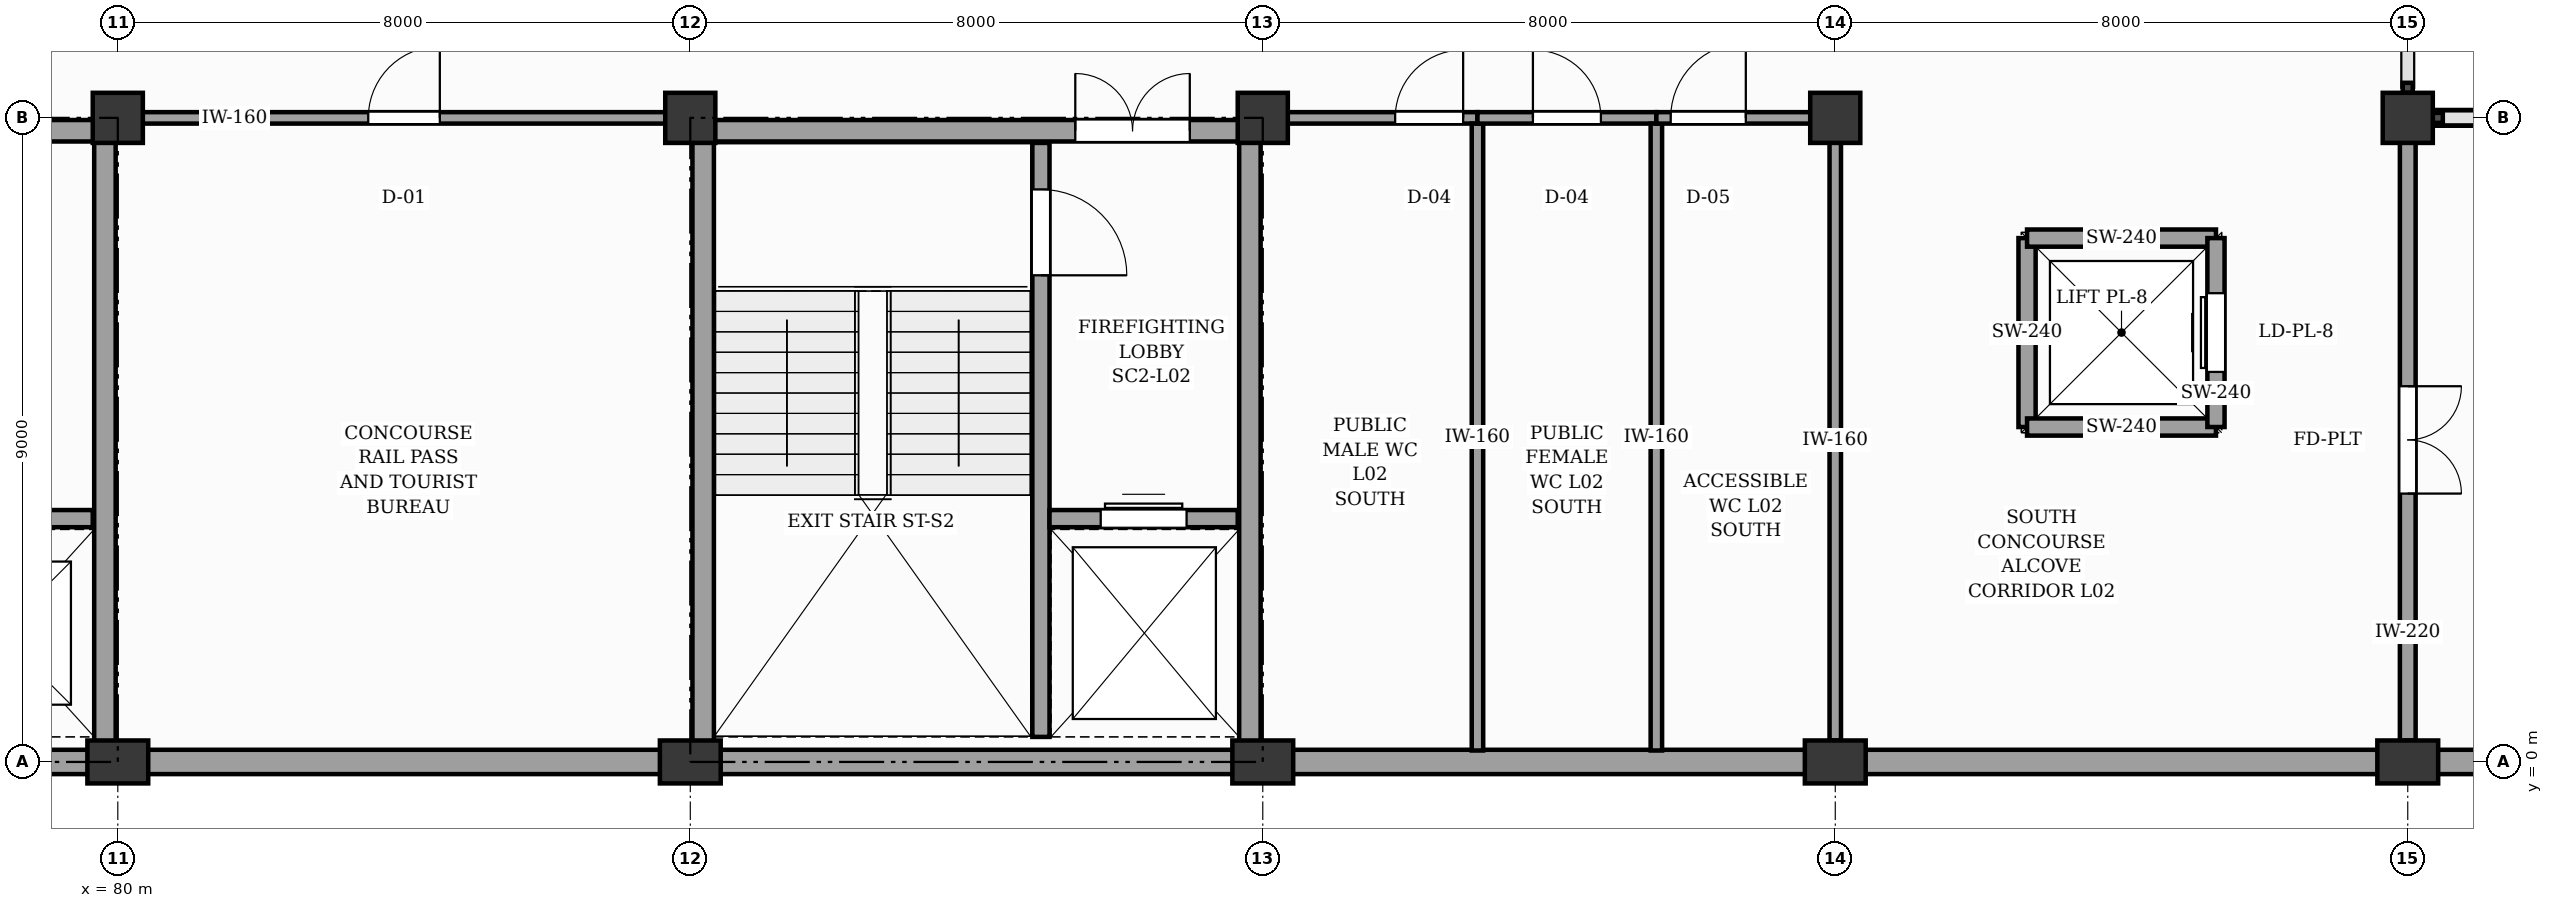
"""IFC4 building model, lengths in metres.
Left out: names, types, materials, properties, quantities, classifications, styles, units other than length and angle.
Written with IfcOpenShell. Run it as: python <this file> out.ifc"""

import sys

from ifc_helpers import new_model, si_unit, direction, frame, frame_2d, origin, origin_2d, place, context, subcontext, project, spatial, rectangle, extrude, element, fill, save


model = new_model("IFC4")
c1 = context("Model", 3, precision=1e-05, world=origin(), true_north=direction((0.0, 1.0)))
c2 = subcontext(c1, "Body", "Model", "MODEL_VIEW")
j1 = project(units=[si_unit("LENGTHUNIT", "METRE"), si_unit("PLANEANGLEUNIT", "RADIAN")], contexts=[c1])
p1 = place(None, origin())
s1 = spatial("IfcSite", under=j1, at=p1, CompositionType="ELEMENT")
p2 = place(p1, origin())
s2 = spatial("IfcBuilding", under=s1, at=p2, CompositionType="ELEMENT")
p3 = place(p2, frame((0.0, 0.0, 9.6)))
s3 = spatial("IfcBuildingStorey", under=s2, at=p3, CompositionType="ELEMENT", Elevation=9.6)
p4 = place(p3, frame((80.0, 0.0, 0.0), z_axis=(0.0, 0.0, 1.0), x_axis=(1.0, 0.0, 0.0)))
e1 = element("IfcColumn", 1, at=p4, inside=s3, PredefinedType="PILASTER", context=c2, shape_type="SweptSolid", body=[
    extrude(rectangle(XDim=0.85, YDim=0.6, at=origin_2d()), origin(), (0.0, 0.0, 1.0), 6.6),
])
p5 = place(p3, frame((80.0, 9.0, 0.0), z_axis=(0.0, 0.0, 1.0), x_axis=(1.0, 0.0, 0.0)))
e2 = element("IfcColumn", 2, at=p5, inside=s3, PredefinedType="COLUMN", context=c2, shape_type="SweptSolid", body=[
    extrude(rectangle(XDim=0.7, YDim=0.7, at=origin_2d()), origin(), (0.0, 0.0, 1.0), 6.6),
])
p6 = place(p3, frame((88.0, 0.0, 0.0), z_axis=(0.0, 0.0, 1.0), x_axis=(1.0, 0.0, 0.0)))
e3 = element("IfcColumn", 3, at=p6, inside=s3, PredefinedType="PILASTER", context=c2, shape_type="SweptSolid", body=[
    extrude(rectangle(XDim=0.85, YDim=0.6, at=origin_2d()), origin(), (0.0, 0.0, 1.0), 6.6),
])
p7 = place(p3, frame((88.0, 9.0, 0.0), z_axis=(0.0, 0.0, 1.0), x_axis=(1.0, 0.0, 0.0)))
e4 = element("IfcColumn", 4, at=p7, inside=s3, PredefinedType="COLUMN", context=c2, shape_type="SweptSolid", body=[
    extrude(rectangle(XDim=0.7, YDim=0.7, at=origin_2d()), origin(), (0.0, 0.0, 1.0), 6.6),
])
p8 = place(p3, frame((96.0, 0.0, 0.0), z_axis=(0.0, 0.0, 1.0), x_axis=(1.0, 0.0, 0.0)))
e5 = element("IfcColumn", 5, at=p8, inside=s3, PredefinedType="PILASTER", context=c2, shape_type="SweptSolid", body=[
    extrude(rectangle(XDim=0.85, YDim=0.6, at=origin_2d()), origin(), (0.0, 0.0, 1.0), 6.6),
])
p9 = place(p3, frame((96.0, 9.0, 0.0), z_axis=(0.0, 0.0, 1.0), x_axis=(1.0, 0.0, 0.0)))
e6 = element("IfcColumn", 6, at=p9, inside=s3, PredefinedType="COLUMN", context=c2, shape_type="SweptSolid", body=[
    extrude(rectangle(XDim=0.7, YDim=0.7, at=origin_2d()), origin(), (0.0, 0.0, 1.0), 6.6),
])
p10 = place(p3, frame((104.0, 0.0, 0.0), z_axis=(0.0, 0.0, 1.0), x_axis=(1.0, 0.0, 0.0)))
e7 = element("IfcColumn", 7, at=p10, inside=s3, PredefinedType="PILASTER", context=c2, shape_type="SweptSolid", body=[
    extrude(rectangle(XDim=0.85, YDim=0.6, at=origin_2d()), origin(), (0.0, 0.0, 1.0), 6.6),
])
p11 = place(p3, frame((104.0, 9.0, 0.0), z_axis=(0.0, 0.0, 1.0), x_axis=(1.0, 0.0, 0.0)))
e8 = element("IfcColumn", 8, at=p11, inside=s3, PredefinedType="COLUMN", context=c2, shape_type="SweptSolid", body=[
    extrude(rectangle(XDim=0.7, YDim=0.7, at=origin_2d()), origin(), (0.0, 0.0, 1.0), 6.6),
])
p12 = place(p3, frame((112.0, 0.0, 0.0), z_axis=(0.0, 0.0, 1.0), x_axis=(1.0, 0.0, 0.0)))
e9 = element("IfcColumn", 9, at=p12, inside=s3, PredefinedType="PILASTER", context=c2, shape_type="SweptSolid", body=[
    extrude(rectangle(XDim=0.85, YDim=0.6, at=origin_2d()), origin(), (0.0, 0.0, 1.0), 6.6),
])
p13 = place(p3, frame((112.0, 9.0, 0.0), z_axis=(0.0, 0.0, 1.0), x_axis=(1.0, 0.0, 0.0)))
e10 = element("IfcColumn", 10, at=p13, inside=s3, PredefinedType="COLUMN", context=c2, shape_type="SweptSolid", body=[
    extrude(rectangle(XDim=0.7, YDim=0.7, at=origin_2d()), origin(), (0.0, 0.0, 1.0), 6.6),
])
for number, where, z_axis, x_axis in (
    (11, (72.4, 0.0, 0.0), (0.0, 0.0, 1.0), (1.0, 0.0, 0.0)),
    (12, (80.4, 0.0, 0.0), (0.0, 0.0, 1.0), (1.0, 0.0, 0.0)),
    (13, (88.4, 0.0, 0.0), (0.0, 0.0, 1.0), (1.0, 0.0, 0.0)),
    (14, (96.4, 0.0, 0.0), (0.0, 0.0, 1.0), (1.0, 0.0, 0.0)),
    (15, (104.4, 0.0, 0.0), (0.0, 0.0, 1.0), (1.0, 0.0, 0.0)),
):
    element("IfcWall", number, at=place(p3, frame(where, z_axis=z_axis, x_axis=x_axis)), inside=s3, PredefinedType="SOLIDWALL", context=c2, shape_type="SweptSolid", body=[
        extrude(rectangle(XDim=7.2, YDim=0.34, at=frame_2d((3.6, 0.0))), origin(), (0.0, 0.0, 1.0), 5.64),
    ])
p14 = place(p3, frame((112.4, 0.0, 0.0), z_axis=(0.0, 0.0, 1.0), x_axis=(1.0, 0.0, 0.0)))
e16 = element("IfcWall", 16, at=p14, inside=s3, PredefinedType="SOLIDWALL", context=c2, shape_type="SweptSolid", body=[
    extrude(rectangle(XDim=7.2, YDim=0.34, at=frame_2d((3.6, 0.0))), origin(), (0.0, 0.0, 1.0), 4.98),
])
p15 = place(p3, frame((92.9, 0.35, 0.0), z_axis=(0.0, 0.0, 1.0), x_axis=(0.0, 1.0, 0.0)))
e17 = element("IfcWall", 17, at=p15, inside=s3, PredefinedType="SHEAR", context=c2, shape_type="SweptSolid", body=[
    extrude(rectangle(XDim=8.3, YDim=0.24, at=frame_2d((4.15, 0.0))), origin(), (0.0, 0.0, 1.0), 6.32),
])
p16 = place(p15, frame((6.45, 0.0, 0.0)))
e18 = element("IfcOpeningElement", 18, at=p16, cuts=e17, PredefinedType="OPENING", context=c2, shape_type="SweptSolid", body=[
    extrude(rectangle(XDim=1.2, YDim=2.15, at=frame_2d((0.6, 1.075))), frame((0.0, 0.13, 0.0), z_axis=(0.0, -1.0, 0.0), x_axis=(1.0, 0.0, 0.0)), (0.0, 0.0, 1.0), 0.26),
])
p17 = place(p3, frame((93.02, 3.4, 0.0), z_axis=(0.0, 0.0, 1.0), x_axis=(1.0, 0.0, 0.0)))
e19 = element("IfcWall", 19, at=p17, inside=s3, PredefinedType="SHEAR", context=c2, shape_type="SweptSolid", body=[
    extrude(rectangle(XDim=2.63, YDim=0.24, at=frame_2d((1.315, 0.0))), origin(), (0.0, 0.0, 1.0), 6.32),
])
p18 = place(p17, frame((0.715, 0.0, 0.0)))
e20 = element("IfcOpeningElement", 20, at=p18, cuts=e19, PredefinedType="OPENING", context=c2, shape_type="SweptSolid", body=[
    extrude(rectangle(XDim=1.2, YDim=2.15, at=frame_2d((0.6, 1.075))), frame((0.0, 0.13, 0.0), z_axis=(0.0, -1.0, 0.0), x_axis=(1.0, 0.0, 0.0)), (0.0, 0.0, 1.0), 0.26),
])
for number, where, z_axis, x_axis in (
    (21, (88.18, 0.18, 0.0), (0.0, 0.0, 1.0), (0.0, 1.0, 0.0)),
    (22, (95.82, 0.18, 0.0), (0.0, 0.0, 1.0), (0.0, 1.0, 0.0)),
):
    element("IfcWall", number, at=place(p3, frame(where, z_axis=z_axis, x_axis=x_axis)), inside=s3, PredefinedType="SHEAR", context=c2, shape_type="SweptSolid", body=[
        extrude(rectangle(XDim=8.64, YDim=0.3, at=frame_2d((4.32, 0.0))), origin(), (0.0, 0.0, 1.0), 6.32),
    ])
p19 = place(p3, frame((88.03, 8.82, 0.0), z_axis=(0.0, 0.0, 1.0), x_axis=(1.0, 0.0, 0.0)))
e23 = element("IfcWall", 23, at=p19, inside=s3, PredefinedType="SHEAR", context=c2, shape_type="SweptSolid", body=[
    extrude(rectangle(XDim=7.94, YDim=0.3, at=frame_2d((3.97, 0.0))), origin(), (0.0, 0.0, 1.0), 6.32),
])
p20 = place(p19, frame((5.35, 0.0, 0.0)))
e24 = element("IfcOpeningElement", 24, at=p20, cuts=e23, PredefinedType="OPENING", context=c2, shape_type="SweptSolid", body=[
    extrude(rectangle(XDim=1.6, YDim=2.15, at=frame_2d((0.8, 1.075))), frame((0.0, 0.16, 0.0), z_axis=(0.0, -1.0, 0.0), x_axis=(1.0, 0.0, 0.0)), (0.0, 0.0, 1.0), 0.32),
])
p21 = place(p3, frame((77.02, 3.4, 0.0), z_axis=(0.0, 0.0, 1.0), x_axis=(1.0, 0.0, 0.0)))
e25 = element("IfcWall", 25, at=p21, inside=s3, PredefinedType="SHEAR", context=c2, shape_type="SweptSolid", body=[
    extrude(rectangle(XDim=2.63, YDim=0.24, at=frame_2d((1.315, 0.0))), origin(), (0.0, 0.0, 1.0), 6.32),
])
p22 = place(p21, frame((0.765, 0.0, 0.0)))
e26 = element("IfcOpeningElement", 26, at=p22, cuts=e25, PredefinedType="OPENING", context=c2, shape_type="SweptSolid", body=[
    extrude(rectangle(XDim=1.1, YDim=2.15, at=frame_2d((0.55, 1.075))), frame((0.0, 0.13, 0.0), z_axis=(0.0, -1.0, 0.0), x_axis=(1.0, 0.0, 0.0)), (0.0, 0.0, 1.0), 0.26),
])
p23 = place(p3, frame((79.82, 0.18, 0.0), z_axis=(0.0, 0.0, 1.0), x_axis=(0.0, 1.0, 0.0)))
e27 = element("IfcWall", 27, at=p23, inside=s3, PredefinedType="SHEAR", context=c2, shape_type="SweptSolid", body=[
    extrude(rectangle(XDim=8.64, YDim=0.3, at=frame_2d((4.32, 0.0))), origin(), (0.0, 0.0, 1.0), 6.32),
])
p24 = place(p3, frame((72.03, 8.82, 0.0), z_axis=(0.0, 0.0, 1.0), x_axis=(1.0, 0.0, 0.0)))
e28 = element("IfcWall", 28, at=p24, inside=s3, PredefinedType="SHEAR", context=c2, shape_type="SweptSolid", body=[
    extrude(rectangle(XDim=7.94, YDim=0.3, at=frame_2d((3.97, 0.0))), origin(), (0.0, 0.0, 1.0), 6.32),
])
p25 = place(p24, frame((5.35, 0.0, 0.0)))
e29 = element("IfcOpeningElement", 29, at=p25, cuts=e28, PredefinedType="OPENING", context=c2, shape_type="SweptSolid", body=[
    extrude(rectangle(XDim=1.6, YDim=2.15, at=frame_2d((0.8, 1.075))), frame((0.0, 0.16, 0.0), z_axis=(0.0, -1.0, 0.0), x_axis=(1.0, 0.0, 0.0)), (0.0, 0.0, 1.0), 0.32),
])
for number, where, z_axis, x_axis in (
    (30, (106.68, 4.68, 0.0), (0.0, 0.0, 1.0), (0.0, 1.0, 0.0)),
    (31, (106.68, 4.68, 0.0), (0.0, 0.0, 1.0), (1.0, 0.0, 0.0)),
    (32, (106.68, 7.32, 0.0), (0.0, 0.0, 1.0), (1.0, 0.0, 0.0)),
):
    element("IfcWall", number, at=place(p3, frame(where, z_axis=z_axis, x_axis=x_axis)), inside=s3, PredefinedType="SHEAR", context=c2, shape_type="SweptSolid", body=[
        extrude(rectangle(XDim=2.64, YDim=0.24, at=frame_2d((1.32, 0.0))), origin(), (0.0, 0.0, 1.0), 6.35),
    ])
p26 = place(p3, frame((109.32, 4.68, 0.0), z_axis=(0.0, 0.0, 1.0), x_axis=(0.0, 1.0, 0.0)))
e33 = element("IfcWall", 33, at=p26, inside=s3, PredefinedType="SHEAR", context=c2, shape_type="SweptSolid", body=[
    extrude(rectangle(XDim=2.64, YDim=0.24, at=frame_2d((1.32, 0.0))), origin(), (0.0, 0.0, 1.0), 6.35),
])
p27 = place(p26, frame((0.77, 0.0, 0.0)))
e34 = element("IfcOpeningElement", 34, at=p27, cuts=e33, PredefinedType="OPENING", context=c2, shape_type="SweptSolid", body=[
    extrude(rectangle(XDim=1.1, YDim=2.15, at=frame_2d((0.55, 1.075))), frame((0.0, 0.13, 0.0), z_axis=(0.0, -1.0, 0.0), x_axis=(1.0, 0.0, 0.0)), (0.0, 0.0, 1.0), 0.26),
])
p28 = place(p3, frame((80.3, 9.0, 0.0), z_axis=(0.0, 0.0, 1.0), x_axis=(1.0, 0.0, 0.0)))
e35 = element("IfcWall", 35, at=p28, inside=s3, PredefinedType="PARTITIONING", context=c2, shape_type="SweptSolid", body=[
    extrude(rectangle(XDim=7.4, YDim=0.16, at=frame_2d((3.7, 0.0))), origin(), (0.0, 0.0, 1.0), 5.5),
])
p29 = place(p28, frame((3.2, 0.0, 0.0)))
e36 = element("IfcOpeningElement", 36, at=p29, cuts=e35, PredefinedType="OPENING", context=c2, shape_type="SweptSolid", body=[
    extrude(rectangle(XDim=1.0, YDim=2.1, at=frame_2d((0.5, 1.05))), frame((0.0, 0.09, 0.0), z_axis=(0.0, -1.0, 0.0), x_axis=(1.0, 0.0, 0.0)), (0.0, 0.0, 1.0), 0.18),
])
p30 = place(p3, frame((96.3, 9.0, 0.0), z_axis=(0.0, 0.0, 1.0), x_axis=(1.0, 0.0, 0.0)))
e37 = element("IfcWall", 37, at=p30, inside=s3, PredefinedType="PARTITIONING", context=c2, shape_type="SweptSolid", body=[
    extrude(rectangle(XDim=2.7, YDim=0.16, at=frame_2d((1.35, 0.0))), origin(), (0.0, 0.0, 1.0), 5.5),
])
p31 = place(p30, frame((1.55, 0.0, 0.0)))
e38 = element("IfcOpeningElement", 38, at=p31, cuts=e37, PredefinedType="OPENING", context=c2, shape_type="SweptSolid", body=[
    extrude(rectangle(XDim=0.95, YDim=2.1, at=frame_2d((0.475, 1.05))), frame((0.0, 0.09, 0.0), z_axis=(0.0, -1.0, 0.0), x_axis=(1.0, 0.0, 0.0)), (0.0, 0.0, 1.0), 0.18),
])
p32 = place(p3, frame((99.0, 0.16, 0.0), z_axis=(0.0, 0.0, 1.0), x_axis=(0.0, 1.0, 0.0)))
e39 = element("IfcWall", 39, at=p32, inside=s3, PredefinedType="PARTITIONING", context=c2, shape_type="SweptSolid", body=[
    extrude(rectangle(XDim=8.76, YDim=0.16, at=frame_2d((4.38, 0.0))), origin(), (0.0, 0.0, 1.0), 5.5),
])
p33 = place(p3, frame((99.0, 9.0, 0.0), z_axis=(0.0, 0.0, 1.0), x_axis=(1.0, 0.0, 0.0)))
e40 = element("IfcWall", 40, at=p33, inside=s3, PredefinedType="PARTITIONING", context=c2, shape_type="SweptSolid", body=[
    extrude(rectangle(XDim=2.5, YDim=0.16, at=frame_2d((1.25, 0.0))), origin(), (0.0, 0.0, 1.0), 5.5),
])
p34 = place(p33, frame((0.775, 0.0, 0.0)))
e41 = element("IfcOpeningElement", 41, at=p34, cuts=e40, PredefinedType="OPENING", context=c2, shape_type="SweptSolid", body=[
    extrude(rectangle(XDim=0.95, YDim=2.1, at=frame_2d((0.475, 1.05))), frame((0.0, 0.09, 0.0), z_axis=(0.0, -1.0, 0.0), x_axis=(1.0, 0.0, 0.0)), (0.0, 0.0, 1.0), 0.18),
])
p35 = place(p3, frame((101.5, 0.16, 0.0), z_axis=(0.0, 0.0, 1.0), x_axis=(0.0, 1.0, 0.0)))
e42 = element("IfcWall", 42, at=p35, inside=s3, PredefinedType="PARTITIONING", context=c2, shape_type="SweptSolid", body=[
    extrude(rectangle(XDim=8.76, YDim=0.16, at=frame_2d((4.38, 0.0))), origin(), (0.0, 0.0, 1.0), 5.5),
])
p36 = place(p3, frame((101.5, 9.0, 0.0), z_axis=(0.0, 0.0, 1.0), x_axis=(1.0, 0.0, 0.0)))
e43 = element("IfcWall", 43, at=p36, inside=s3, PredefinedType="PARTITIONING", context=c2, shape_type="SweptSolid", body=[
    extrude(rectangle(XDim=2.2, YDim=0.16, at=frame_2d((1.1, 0.0))), origin(), (0.0, 0.0, 1.0), 5.5),
])
p37 = place(p36, frame((0.2, 0.0, 0.0)))
e44 = element("IfcOpeningElement", 44, at=p37, cuts=e43, PredefinedType="OPENING", context=c2, shape_type="SweptSolid", body=[
    extrude(rectangle(XDim=1.05, YDim=2.1, at=frame_2d((0.525, 1.05))), frame((0.0, 0.09, 0.0), z_axis=(0.0, -1.0, 0.0), x_axis=(1.0, 0.0, 0.0)), (0.0, 0.0, 1.0), 0.18),
])
p38 = place(p3, frame((104.0, 0.3, 0.0), z_axis=(0.0, 0.0, 1.0), x_axis=(0.0, 1.0, 0.0)))
e45 = element("IfcWall", 45, at=p38, inside=s3, PredefinedType="PARTITIONING", context=c2, shape_type="SweptSolid", body=[
    extrude(rectangle(XDim=8.4, YDim=0.16, at=frame_2d((4.2, 0.0))), origin(), (0.0, 0.0, 1.0), 5.5),
])
p39 = place(p3, frame((112.3, 9.0, 0.0), z_axis=(0.0, 0.0, 1.0), x_axis=(1.0, 0.0, 0.0)))
e46 = element("IfcWall", 46, at=p39, inside=s3, PredefinedType="SOLIDWALL", context=c2, shape_type="SweptSolid", body=[
    extrude(rectangle(XDim=7.4, YDim=0.22, at=frame_2d((3.7, 0.0))), origin(), (0.0, 0.0, 1.0), 4.68),
])
p40 = place(p3, frame((112.0, 0.3, 0.0), z_axis=(0.0, 0.0, 1.0), x_axis=(0.0, 1.0, 0.0)))
e47 = element("IfcWall", 47, at=p40, inside=s3, PredefinedType="SOLIDWALL", context=c2, shape_type="SweptSolid", body=[
    extrude(rectangle(XDim=8.4, YDim=0.22, at=frame_2d((4.2, 0.0))), origin(), (0.0, 0.0, 1.0), 5.5),
])
p41 = place(p40, frame((3.45, 0.0, 0.0)))
e48 = element("IfcOpeningElement", 48, at=p41, cuts=e47, PredefinedType="OPENING", context=c2, shape_type="SweptSolid", body=[
    extrude(rectangle(XDim=1.5, YDim=2.2, at=frame_2d((0.75, 1.1))), frame((0.0, 0.12, 0.0), z_axis=(0.0, -1.0, 0.0), x_axis=(1.0, 0.0, 0.0)), (0.0, 0.0, 1.0), 0.24),
])
p42 = place(p16, frame((1.2, 0.0, 0.0), z_axis=(0.0, 0.0, 1.0), x_axis=(-1.0, 0.0, 0.0)))
e49 = element("IfcDoor", 49, at=p42, inside=s3, OperationType="SINGLE_SWING_LEFT", PredefinedType="DOOR", context=c2, shape_type="SweptSolid", body=[
    extrude(rectangle(XDim=1.2, YDim=2.15, at=frame_2d((0.6, 1.075))), frame((0.0, 0.025, 0.0), z_axis=(0.0, -1.0, 0.0), x_axis=(1.0, 0.0, 0.0)), (0.0, 0.0, 1.0), 0.05),
])
fill(e18, e49)
p43 = place(p18, origin())
e50 = element("IfcDoor", 50, at=p43, inside=s3, OperationType="DOUBLE_DOOR_SLIDING", PredefinedType="DOOR", context=c2, shape_type="SweptSolid", body=[
    extrude(rectangle(XDim=1.2, YDim=2.15, at=frame_2d((0.6, 1.075))), frame((0.0, 0.025, 0.0), z_axis=(0.0, -1.0, 0.0), x_axis=(1.0, 0.0, 0.0)), (0.0, 0.0, 1.0), 0.05),
])
fill(e20, e50)
p44 = place(p20, origin())
e51 = element("IfcDoor", 51, at=p44, inside=s3, OperationType="DOUBLE_DOOR_SINGLE_SWING", PredefinedType="DOOR", context=c2, shape_type="SweptSolid", body=[
    extrude(rectangle(XDim=1.6, YDim=2.15, at=frame_2d((0.8, 1.075))), frame((0.0, 0.025, 0.0), z_axis=(0.0, -1.0, 0.0), x_axis=(1.0, 0.0, 0.0)), (0.0, 0.0, 1.0), 0.05),
])
fill(e24, e51)
p45 = place(p27, origin())
e52 = element("IfcDoor", 52, at=p45, inside=s3, OperationType="DOUBLE_DOOR_SLIDING", PredefinedType="DOOR", context=c2, shape_type="SweptSolid", body=[
    extrude(rectangle(XDim=1.1, YDim=2.15, at=frame_2d((0.55, 1.075))), frame((0.0, 0.025, 0.0), z_axis=(0.0, -1.0, 0.0), x_axis=(1.0, 0.0, 0.0)), (0.0, 0.0, 1.0), 0.05),
])
fill(e34, e52)
p46 = place(p29, origin())
e53 = element("IfcDoor", 53, at=p46, inside=s3, OperationType="SINGLE_SWING_RIGHT", PredefinedType="DOOR", context=c2, shape_type="SweptSolid", body=[
    extrude(rectangle(XDim=1.0, YDim=2.1, at=frame_2d((0.5, 1.05))), frame((0.0, 0.025, 0.0), z_axis=(0.0, -1.0, 0.0), x_axis=(1.0, 0.0, 0.0)), (0.0, 0.0, 1.0), 0.05),
])
fill(e36, e53)
p47 = place(p31, origin())
e54 = element("IfcDoor", 54, at=p47, inside=s3, OperationType="SINGLE_SWING_RIGHT", PredefinedType="DOOR", context=c2, shape_type="SweptSolid", body=[
    extrude(rectangle(XDim=0.95, YDim=2.1, at=frame_2d((0.475, 1.05))), frame((0.0, 0.025, 0.0), z_axis=(0.0, -1.0, 0.0), x_axis=(1.0, 0.0, 0.0)), (0.0, 0.0, 1.0), 0.05),
])
fill(e38, e54)
p48 = place(p34, origin())
e55 = element("IfcDoor", 55, at=p48, inside=s3, OperationType="SINGLE_SWING_LEFT", PredefinedType="DOOR", context=c2, shape_type="SweptSolid", body=[
    extrude(rectangle(XDim=0.95, YDim=2.1, at=frame_2d((0.475, 1.05))), frame((0.0, 0.025, 0.0), z_axis=(0.0, -1.0, 0.0), x_axis=(1.0, 0.0, 0.0)), (0.0, 0.0, 1.0), 0.05),
])
fill(e41, e55)
p49 = place(p37, origin())
e56 = element("IfcDoor", 56, at=p49, inside=s3, OperationType="SINGLE_SWING_RIGHT", PredefinedType="DOOR", context=c2, shape_type="SweptSolid", body=[
    extrude(rectangle(XDim=1.05, YDim=2.1, at=frame_2d((0.525, 1.05))), frame((0.0, 0.025, 0.0), z_axis=(0.0, -1.0, 0.0), x_axis=(1.0, 0.0, 0.0)), (0.0, 0.0, 1.0), 0.05),
])
fill(e44, e56)
p50 = place(p41, frame((1.5, 0.0, 0.0), z_axis=(0.0, 0.0, 1.0), x_axis=(-1.0, 0.0, 0.0)))
e57 = element("IfcDoor", 57, at=p50, inside=s3, OperationType="DOUBLE_DOOR_SINGLE_SWING", PredefinedType="DOOR", context=c2, shape_type="SweptSolid", body=[
    extrude(rectangle(XDim=1.5, YDim=2.2, at=frame_2d((0.75, 1.1))), frame((0.0, 0.025, 0.0), z_axis=(0.0, -1.0, 0.0), x_axis=(1.0, 0.0, 0.0)), (0.0, 0.0, 1.0), 0.05),
])
fill(e48, e57)
save(model, sys.argv[1])
